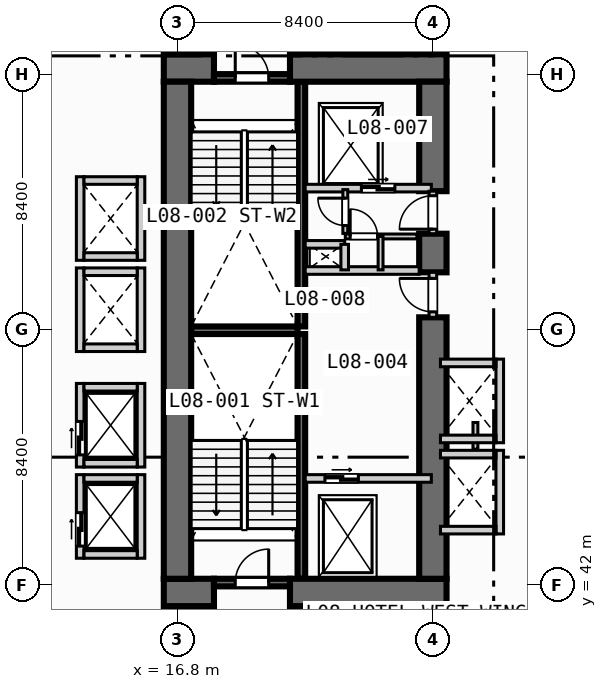
"""IFC4 building model, lengths in metres.
Left out: names, types, materials, properties, quantities, classifications, styles, units other than length and angle.
Written with IfcOpenShell. Run it as: python <this file> out.ifc"""

import sys

from ifc_helpers import new_model, si_unit, direction, frame, frame_2d, origin, place, context, subcontext, project, spatial, rectangle, extrude, element, fill, save


model = new_model("IFC4")
c1 = context("Model", 3, precision=1e-05, world=origin(), true_north=direction((0.0, 1.0)))
c2 = subcontext(c1, "Body", "Model", "MODEL_VIEW")
j1 = project(units=[si_unit("LENGTHUNIT", "METRE"), si_unit("PLANEANGLEUNIT", "RADIAN")], contexts=[c1])
p1 = place(None, origin())
s1 = spatial("IfcSite", under=j1, at=p1, CompositionType="ELEMENT")
p2 = place(p1, origin())
s2 = spatial("IfcBuilding", under=s1, at=p2, CompositionType="ELEMENT")
p3 = place(p2, frame((0.0, 0.0, 39.6)))
s3 = spatial("IfcBuildingStorey", under=s2, at=p3, CompositionType="ELEMENT", Elevation=39.6)
for number, where, z_axis, x_axis in (
    (1, (20.875, 42.2, 0.0), (0.0, 0.0, 1.0), (0.0, 1.0, 0.0)),
    (2, (20.875, 50.5, 0.0), (0.0, 0.0, 1.0), (0.0, 1.0, 0.0)),
):
    element("IfcWall", number, at=place(p3, frame(where, z_axis=z_axis, x_axis=x_axis)), inside=s3, PredefinedType="SOLIDWALL", context=c2, shape_type="SweptSolid", body=[
        extrude(rectangle(XDim=8.05, YDim=0.25, at=frame_2d((4.025, 0.0))), origin(), (0.0, 0.0, 1.0), 3.55),
    ])
p4 = place(p3, frame((17.25, 50.375, 0.0), z_axis=(0.0, 0.0, 1.0), x_axis=(1.0, 0.0, 0.0)))
e3 = element("IfcWall", 3, at=p4, inside=s3, PredefinedType="SOLIDWALL", context=c2, shape_type="SweptSolid", body=[
    extrude(rectangle(XDim=3.5, YDim=0.25, at=frame_2d((1.75, 0.0))), origin(), (0.0, 0.0, 1.0), 3.55),
])
p5 = place(p3, frame((16.35, 41.75, 0.0), z_axis=(0.0, 0.0, 1.0), x_axis=(1.0, 0.0, 0.0)))
e4 = element("IfcWall", 4, at=p5, inside=s3, PredefinedType="SHEAR", context=c2, shape_type="SweptSolid", body=[
    extrude(rectangle(XDim=1.65, YDim=0.9, at=frame_2d((0.825, 0.0))), origin(), (0.0, 0.0, 1.0), 3.55),
])
p6 = place(p3, frame((20.5, 41.75, 0.0), z_axis=(0.0, 0.0, 1.0), x_axis=(1.0, 0.0, 0.0)))
e5 = element("IfcWall", 5, at=p6, inside=s3, PredefinedType="SHEAR", context=c2, shape_type="SweptSolid", body=[
    extrude(rectangle(XDim=5.15, YDim=0.9, at=frame_2d((2.575, 0.0))), origin(), (0.0, 0.0, 1.0), 3.55),
])
p7 = place(p3, frame((16.35, 59.0, 0.0), z_axis=(0.0, 0.0, 1.0), x_axis=(1.0, 0.0, 0.0)))
e6 = element("IfcWall", 6, at=p7, inside=s3, PredefinedType="SHEAR", context=c2, shape_type="SweptSolid", body=[
    extrude(rectangle(XDim=1.65, YDim=0.9, at=frame_2d((0.825, 0.0))), origin(), (0.0, 0.0, 1.0), 3.55),
])
p8 = place(p3, frame((20.5, 59.0, 0.0), z_axis=(0.0, 0.0, 1.0), x_axis=(1.0, 0.0, 0.0)))
e7 = element("IfcWall", 7, at=p8, inside=s3, PredefinedType="SHEAR", context=c2, shape_type="SweptSolid", body=[
    extrude(rectangle(XDim=5.15, YDim=0.9, at=frame_2d((2.575, 0.0))), origin(), (0.0, 0.0, 1.0), 3.55),
])
p9 = place(p3, frame((16.8, 42.2, 0.0), z_axis=(0.0, 0.0, 1.0), x_axis=(0.0, 1.0, 0.0)))
e8 = element("IfcWall", 8, at=p9, inside=s3, PredefinedType="SHEAR", context=c2, shape_type="SweptSolid", body=[
    extrude(rectangle(XDim=16.35, YDim=0.9, at=frame_2d((8.175, 0.0))), origin(), (0.0, 0.0, 1.0), 3.55),
])
p10 = place(p3, frame((25.2, 42.2, 0.0), z_axis=(0.0, 0.0, 1.0), x_axis=(0.0, 1.0, 0.0)))
e9 = element("IfcWall", 9, at=p10, inside=s3, PredefinedType="SHEAR", context=c2, shape_type="SweptSolid", body=[
    extrude(rectangle(XDim=8.6, YDim=0.9, at=frame_2d((4.3, 0.0))), origin(), (0.0, 0.0, 1.0), 3.55),
])
p11 = place(p3, frame((25.2, 52.28, 0.0), z_axis=(0.0, 0.0, 1.0), x_axis=(0.0, 1.0, 0.0)))
e10 = element("IfcWall", 10, at=p11, inside=s3, PredefinedType="SHEAR", context=c2, shape_type="SweptSolid", body=[
    extrude(rectangle(XDim=1.27, YDim=0.9, at=frame_2d((0.635, 0.0))), origin(), (0.0, 0.0, 1.0), 3.55),
])
p12 = place(p3, frame((25.2, 54.95, 0.0), z_axis=(0.0, 0.0, 1.0), x_axis=(0.0, 1.0, 0.0)))
e11 = element("IfcWall", 11, at=p12, inside=s3, PredefinedType="SHEAR", context=c2, shape_type="SweptSolid", body=[
    extrude(rectangle(XDim=3.6, YDim=0.9, at=frame_2d((1.8, 0.0))), origin(), (0.0, 0.0, 1.0), 3.55),
])
p13 = place(p3, frame((18.0, 42.075, 0.0), z_axis=(0.0, 0.0, 1.0), x_axis=(1.0, 0.0, 0.0)))
e12 = element("IfcWall", 12, at=p13, inside=s3, PredefinedType="SOLIDWALL", context=c2, shape_type="SweptSolid", body=[
    extrude(rectangle(XDim=2.5, YDim=0.25, at=frame_2d((1.25, 0.0))), origin(), (0.0, 0.0, 1.0), 3.55),
])
p14 = place(p13, frame((0.7, 0.0, 0.0)))
e13 = element("IfcOpeningElement", 13, at=p14, cuts=e12, PredefinedType="OPENING", context=c2, shape_type="SweptSolid", body=[
    extrude(rectangle(XDim=1.1, YDim=2.15, at=frame_2d((0.55, 1.075))), frame((0.0, 0.135, 0.0), z_axis=(0.0, -1.0, 0.0), x_axis=(1.0, 0.0, 0.0)), (0.0, 0.0, 1.0), 0.27),
])
p15 = place(p3, frame((18.0, 58.675, 0.0), z_axis=(0.0, 0.0, 1.0), x_axis=(1.0, 0.0, 0.0)))
e14 = element("IfcWall", 14, at=p15, inside=s3, PredefinedType="SOLIDWALL", context=c2, shape_type="SweptSolid", body=[
    extrude(rectangle(XDim=2.5, YDim=0.25, at=frame_2d((1.25, 0.0))), origin(), (0.0, 0.0, 1.0), 3.55),
])
p16 = place(p15, frame((0.7, 0.0, 0.0)))
e15 = element("IfcOpeningElement", 15, at=p16, cuts=e14, PredefinedType="OPENING", context=c2, shape_type="SweptSolid", body=[
    extrude(rectangle(XDim=1.1, YDim=2.15, at=frame_2d((0.55, 1.075))), frame((0.0, 0.135, 0.0), z_axis=(0.0, -1.0, 0.0), x_axis=(1.0, 0.0, 0.0)), (0.0, 0.0, 1.0), 0.27),
])
p17 = place(p3, frame((21.0, 45.5, 0.0), z_axis=(0.0, 0.0, 1.0), x_axis=(1.0, 0.0, 0.0)))
e16 = element("IfcWall", 16, at=p17, inside=s3, PredefinedType="SOLIDWALL", context=c2, shape_type="SweptSolid", body=[
    extrude(rectangle(XDim=4.15, YDim=0.25, at=frame_2d((2.075, 0.0))), origin(), (0.0, 0.0, 1.0), 3.55),
])
p18 = place(p17, frame((0.65, 0.0, 0.0)))
e17 = element("IfcOpeningElement", 17, at=p18, cuts=e16, PredefinedType="OPENING", context=c2, shape_type="SweptSolid", body=[
    extrude(rectangle(XDim=1.1, YDim=2.15, at=frame_2d((0.55, 1.075))), frame((0.0, 0.135, 0.0), z_axis=(0.0, -1.0, 0.0), x_axis=(1.0, 0.0, 0.0)), (0.0, 0.0, 1.0), 0.27),
])
p19 = place(p3, frame((25.2, 50.8, 0.0), z_axis=(0.0, 0.0, 1.0), x_axis=(0.0, 1.0, 0.0)))
e18 = element("IfcWall", 18, at=p19, inside=s3, PredefinedType="SOLIDWALL", context=c2, shape_type="SweptSolid", body=[
    extrude(rectangle(XDim=1.48, YDim=0.25, at=frame_2d((0.74, 0.0))), origin(), (0.0, 0.0, 1.0), 3.55),
])
p20 = place(p19, frame((0.18, 0.0, 0.0)))
e19 = element("IfcOpeningElement", 19, at=p20, cuts=e18, PredefinedType="OPENING", context=c2, shape_type="SweptSolid", body=[
    extrude(rectangle(XDim=1.1, YDim=2.15, at=frame_2d((0.55, 1.075))), frame((0.0, 0.135, 0.0), z_axis=(0.0, -1.0, 0.0), x_axis=(1.0, 0.0, 0.0)), (0.0, 0.0, 1.0), 0.27),
])
p21 = place(p3, frame((21.0, 52.34, 0.0), z_axis=(0.0, 0.0, 1.0), x_axis=(1.0, 0.0, 0.0)))
e20 = element("IfcWall", 20, at=p21, inside=s3, PredefinedType="SOLIDWALL", context=c2, shape_type="SweptSolid", body=[
    extrude(rectangle(XDim=3.75, YDim=0.25, at=frame_2d((1.875, 0.0))), origin(), (0.0, 0.0, 1.0), 3.55),
])
p22 = place(p3, frame((21.0, 55.05, 0.0), z_axis=(0.0, 0.0, 1.0), x_axis=(1.0, 0.0, 0.0)))
e21 = element("IfcWall", 21, at=p22, inside=s3, PredefinedType="SOLIDWALL", context=c2, shape_type="SweptSolid", body=[
    extrude(rectangle(XDim=4.15, YDim=0.25, at=frame_2d((2.075, 0.0))), origin(), (0.0, 0.0, 1.0), 3.55),
])
p23 = place(p22, frame((1.85, 0.0, 0.0)))
e22 = element("IfcOpeningElement", 22, at=p23, cuts=e21, PredefinedType="OPENING", context=c2, shape_type="SweptSolid", body=[
    extrude(rectangle(XDim=1.1, YDim=2.15, at=frame_2d((0.55, 1.075))), frame((0.0, 0.135, 0.0), z_axis=(0.0, -1.0, 0.0), x_axis=(1.0, 0.0, 0.0)), (0.0, 0.0, 1.0), 0.27),
])
p24 = place(p3, frame((25.2, 53.55, 0.0), z_axis=(0.0, 0.0, 1.0), x_axis=(0.0, 1.0, 0.0)))
e23 = element("IfcWall", 23, at=p24, inside=s3, PredefinedType="SOLIDWALL", context=c2, shape_type="SweptSolid", body=[
    extrude(rectangle(XDim=1.4, YDim=0.25, at=frame_2d((0.7, 0.0))), origin(), (0.0, 0.0, 1.0), 3.55),
])
p25 = place(p24, frame((0.15, 0.0, 0.0)))
e24 = element("IfcOpeningElement", 24, at=p25, cuts=e23, PredefinedType="OPENING", context=c2, shape_type="SweptSolid", body=[
    extrude(rectangle(XDim=1.1, YDim=2.15, at=frame_2d((0.55, 1.075))), frame((0.0, 0.135, 0.0), z_axis=(0.0, -1.0, 0.0), x_axis=(1.0, 0.0, 0.0)), (0.0, 0.0, 1.0), 0.27),
])
p26 = place(p3, frame((21.0, 53.2, 0.0), z_axis=(0.0, 0.0, 1.0), x_axis=(1.0, 0.0, 0.0)))
e25 = element("IfcWall", 25, at=p26, inside=s3, PredefinedType="SOLIDWALL", context=c2, shape_type="SweptSolid", body=[
    extrude(rectangle(XDim=1.3, YDim=0.25, at=frame_2d((0.65, 0.0))), origin(), (0.0, 0.0, 1.0), 3.55),
])
p27 = place(p3, frame((22.3, 52.36, 0.0), z_axis=(0.0, 0.0, 1.0), x_axis=(0.0, 1.0, 0.0)))
e26 = element("IfcWall", 26, at=p27, inside=s3, PredefinedType="SOLIDWALL", context=c2, shape_type="SweptSolid", body=[
    extrude(rectangle(XDim=0.84, YDim=0.25, at=frame_2d((0.42, 0.0))), origin(), (0.0, 0.0, 1.0), 3.55),
])
p28 = place(p3, frame((22.32, 53.56, 0.0), z_axis=(0.0, 0.0, 1.0), x_axis=(0.0, 1.0, 0.0)))
e27 = element("IfcWall", 27, at=p28, inside=s3, PredefinedType="PARTITIONING", context=c2, shape_type="SweptSolid", body=[
    extrude(rectangle(XDim=1.44, YDim=0.16, at=frame_2d((0.72, 0.0))), origin(), (0.0, 0.0, 1.0), 3.55),
])
p29 = place(p28, frame((0.26, 0.0, 0.0)))
e28 = element("IfcOpeningElement", 28, at=p29, cuts=e27, PredefinedType="OPENING", context=c2, shape_type="SweptSolid", body=[
    extrude(rectangle(XDim=0.9, YDim=2.1, at=frame_2d((0.45, 1.05))), frame((0.0, 0.09, 0.0), z_axis=(0.0, -1.0, 0.0), x_axis=(1.0, 0.0, 0.0)), (0.0, 0.0, 1.0), 0.18),
])
p30 = place(p3, frame((22.32, 53.46, 0.0), z_axis=(0.0, 0.0, 1.0), x_axis=(1.0, 0.0, 0.0)))
e29 = element("IfcWall", 29, at=p30, inside=s3, PredefinedType="PARTITIONING", context=c2, shape_type="SweptSolid", body=[
    extrude(rectangle(XDim=2.36, YDim=0.16, at=frame_2d((1.18, 0.0))), origin(), (0.0, 0.0, 1.0), 3.55),
])
p31 = place(p30, frame((0.16, 0.0, 0.0)))
e30 = element("IfcOpeningElement", 30, at=p31, cuts=e29, PredefinedType="OPENING", context=c2, shape_type="SweptSolid", body=[
    extrude(rectangle(XDim=0.9, YDim=2.1, at=frame_2d((0.45, 1.05))), frame((0.0, 0.09, 0.0), z_axis=(0.0, -1.0, 0.0), x_axis=(1.0, 0.0, 0.0)), (0.0, 0.0, 1.0), 0.18),
])
p32 = place(p3, frame((23.48, 52.36, 0.0), z_axis=(0.0, 0.0, 1.0), x_axis=(0.0, 1.0, 0.0)))
e31 = element("IfcWall", 31, at=p32, inside=s3, PredefinedType="PARTITIONING", context=c2, shape_type="SweptSolid", body=[
    extrude(rectangle(XDim=1.1, YDim=0.16, at=frame_2d((0.55, 0.0))), origin(), (0.0, 0.0, 1.0), 3.55),
])
p33 = place(p3, frame((13.6, 42.875, 0.0), z_axis=(0.0, 0.0, 1.0), x_axis=(0.0, 1.0, 0.0)))
e32 = element("IfcWall", 32, at=p33, inside=s3, PredefinedType="SOLIDWALL", context=c2, shape_type="SweptSolid", body=[
    extrude(rectangle(XDim=2.75, YDim=0.25, at=frame_2d((1.375, 0.0))), origin(), (0.0, 0.0, 1.0), 3.55),
])
p34 = place(p33, frame((0.4, 0.0, 0.0)))
e33 = element("IfcOpeningElement", 33, at=p34, cuts=e32, PredefinedType="OPENING", context=c2, shape_type="SweptSolid", body=[
    extrude(rectangle(XDim=1.1, YDim=2.15, at=frame_2d((0.55, 1.075))), frame((0.0, 0.135, 0.0), z_axis=(0.0, -1.0, 0.0), x_axis=(1.0, 0.0, 0.0)), (0.0, 0.0, 1.0), 0.27),
])
p35 = place(p3, frame((15.6, 42.875, 0.0), z_axis=(0.0, 0.0, 1.0), x_axis=(0.0, 1.0, 0.0)))
e34 = element("IfcWall", 34, at=p35, inside=s3, PredefinedType="SOLIDWALL", context=c2, shape_type="SweptSolid", body=[
    extrude(rectangle(XDim=2.75, YDim=0.25, at=frame_2d((1.375, 0.0))), origin(), (0.0, 0.0, 1.0), 3.55),
])
for number, where, z_axis, x_axis in (
    (35, (13.725, 43.0, 0.0), (0.0, 0.0, 1.0), (1.0, 0.0, 0.0)),
    (36, (13.725, 45.5, 0.0), (0.0, 0.0, 1.0), (1.0, 0.0, 0.0)),
):
    element("IfcWall", number, at=place(p3, frame(where, z_axis=z_axis, x_axis=x_axis)), inside=s3, PredefinedType="SOLIDWALL", context=c2, shape_type="SweptSolid", body=[
        extrude(rectangle(XDim=1.75, YDim=0.25, at=frame_2d((0.875, 0.0))), origin(), (0.0, 0.0, 1.0), 3.55),
    ])
p36 = place(p3, frame((13.6, 45.875, 0.0), z_axis=(0.0, 0.0, 1.0), x_axis=(0.0, 1.0, 0.0)))
e37 = element("IfcWall", 37, at=p36, inside=s3, PredefinedType="SOLIDWALL", context=c2, shape_type="SweptSolid", body=[
    extrude(rectangle(XDim=2.75, YDim=0.25, at=frame_2d((1.375, 0.0))), origin(), (0.0, 0.0, 1.0), 3.55),
])
p37 = place(p36, frame((0.4, 0.0, 0.0)))
e38 = element("IfcOpeningElement", 38, at=p37, cuts=e37, PredefinedType="OPENING", context=c2, shape_type="SweptSolid", body=[
    extrude(rectangle(XDim=1.1, YDim=2.15, at=frame_2d((0.55, 1.075))), frame((0.0, 0.135, 0.0), z_axis=(0.0, -1.0, 0.0), x_axis=(1.0, 0.0, 0.0)), (0.0, 0.0, 1.0), 0.27),
])
p38 = place(p3, frame((15.6, 45.875, 0.0), z_axis=(0.0, 0.0, 1.0), x_axis=(0.0, 1.0, 0.0)))
e39 = element("IfcWall", 39, at=p38, inside=s3, PredefinedType="SOLIDWALL", context=c2, shape_type="SweptSolid", body=[
    extrude(rectangle(XDim=2.75, YDim=0.25, at=frame_2d((1.375, 0.0))), origin(), (0.0, 0.0, 1.0), 3.55),
])
for number, where, z_axis, x_axis in (
    (40, (13.725, 46.0, 0.0), (0.0, 0.0, 1.0), (1.0, 0.0, 0.0)),
    (41, (13.725, 48.5, 0.0), (0.0, 0.0, 1.0), (1.0, 0.0, 0.0)),
):
    element("IfcWall", number, at=place(p3, frame(where, z_axis=z_axis, x_axis=x_axis)), inside=s3, PredefinedType="SOLIDWALL", context=c2, shape_type="SweptSolid", body=[
        extrude(rectangle(XDim=1.75, YDim=0.25, at=frame_2d((0.875, 0.0))), origin(), (0.0, 0.0, 1.0), 3.55),
    ])
for number, where, z_axis, x_axis in (
    (42, (13.6, 49.675, 0.0), (0.0, 0.0, 1.0), (0.0, 1.0, 0.0)),
    (43, (15.6, 49.675, 0.0), (0.0, 0.0, 1.0), (0.0, 1.0, 0.0)),
):
    element("IfcWall", number, at=place(p3, frame(where, z_axis=z_axis, x_axis=x_axis)), inside=s3, PredefinedType="SOLIDWALL", context=c2, shape_type="SweptSolid", body=[
        extrude(rectangle(XDim=2.75, YDim=0.25, at=frame_2d((1.375, 0.0))), origin(), (0.0, 0.0, 1.0), 3.55),
    ])
for number, where, z_axis, x_axis in (
    (44, (13.725, 49.8, 0.0), (0.0, 0.0, 1.0), (1.0, 0.0, 0.0)),
    (45, (13.725, 52.3, 0.0), (0.0, 0.0, 1.0), (1.0, 0.0, 0.0)),
):
    element("IfcWall", number, at=place(p3, frame(where, z_axis=z_axis, x_axis=x_axis)), inside=s3, PredefinedType="SOLIDWALL", context=c2, shape_type="SweptSolid", body=[
        extrude(rectangle(XDim=1.75, YDim=0.25, at=frame_2d((0.875, 0.0))), origin(), (0.0, 0.0, 1.0), 3.55),
    ])
for number, where, z_axis, x_axis in (
    (46, (13.6, 52.675, 0.0), (0.0, 0.0, 1.0), (0.0, 1.0, 0.0)),
    (47, (15.6, 52.675, 0.0), (0.0, 0.0, 1.0), (0.0, 1.0, 0.0)),
):
    element("IfcWall", number, at=place(p3, frame(where, z_axis=z_axis, x_axis=x_axis)), inside=s3, PredefinedType="SOLIDWALL", context=c2, shape_type="SweptSolid", body=[
        extrude(rectangle(XDim=2.75, YDim=0.25, at=frame_2d((1.375, 0.0))), origin(), (0.0, 0.0, 1.0), 3.55),
    ])
for number, where, z_axis, x_axis in (
    (48, (13.725, 52.8, 0.0), (0.0, 0.0, 1.0), (1.0, 0.0, 0.0)),
    (49, (13.725, 55.3, 0.0), (0.0, 0.0, 1.0), (1.0, 0.0, 0.0)),
):
    element("IfcWall", number, at=place(p3, frame(where, z_axis=z_axis, x_axis=x_axis)), inside=s3, PredefinedType="SOLIDWALL", context=c2, shape_type="SweptSolid", body=[
        extrude(rectangle(XDim=1.75, YDim=0.25, at=frame_2d((0.875, 0.0))), origin(), (0.0, 0.0, 1.0), 3.55),
    ])
p39 = place(p3, frame((27.4, 43.675, 0.0), z_axis=(0.0, 0.0, 1.0), x_axis=(0.0, 1.0, 0.0)))
e50 = element("IfcWall", 50, at=p39, inside=s3, PredefinedType="SOLIDWALL", context=c2, shape_type="SweptSolid", body=[
    extrude(rectangle(XDim=2.75, YDim=0.25, at=frame_2d((1.375, 0.0))), origin(), (0.0, 0.0, 1.0), 3.55),
])
for number, where, z_axis, x_axis in (
    (51, (25.45, 43.8, 0.0), (0.0, 0.0, 1.0), (1.0, 0.0, 0.0)),
    (52, (25.45, 46.3, 0.0), (0.0, 0.0, 1.0), (1.0, 0.0, 0.0)),
):
    element("IfcWall", number, at=place(p3, frame(where, z_axis=z_axis, x_axis=x_axis)), inside=s3, PredefinedType="SOLIDWALL", context=c2, shape_type="SweptSolid", body=[
        extrude(rectangle(XDim=1.825, YDim=0.25, at=frame_2d((0.913, 0.0))), origin(), (0.0, 0.0, 1.0), 3.55),
    ])
p40 = place(p3, frame((26.6, 46.46, 0.0), z_axis=(0.0, 0.0, 1.0), x_axis=(0.0, 1.0, 0.0)))
e53 = element("IfcWall", 53, at=p40, inside=s3, PredefinedType="PARTITIONING", context=c2, shape_type="SweptSolid", body=[
    extrude(rectangle(XDim=0.88, YDim=0.16, at=frame_2d((0.44, 0.0))), origin(), (0.0, 0.0, 1.0), 3.55),
])
p41 = place(p3, frame((27.4, 46.675, 0.0), z_axis=(0.0, 0.0, 1.0), x_axis=(0.0, 1.0, 0.0)))
e54 = element("IfcWall", 54, at=p41, inside=s3, PredefinedType="SOLIDWALL", context=c2, shape_type="SweptSolid", body=[
    extrude(rectangle(XDim=2.75, YDim=0.25, at=frame_2d((1.375, 0.0))), origin(), (0.0, 0.0, 1.0), 3.55),
])
for number, where, z_axis, x_axis in (
    (55, (25.45, 46.8, 0.0), (0.0, 0.0, 1.0), (1.0, 0.0, 0.0)),
    (56, (25.45, 49.3, 0.0), (0.0, 0.0, 1.0), (1.0, 0.0, 0.0)),
):
    element("IfcWall", number, at=place(p3, frame(where, z_axis=z_axis, x_axis=x_axis)), inside=s3, PredefinedType="SOLIDWALL", context=c2, shape_type="SweptSolid", body=[
        extrude(rectangle(XDim=1.825, YDim=0.25, at=frame_2d((0.913, 0.0))), origin(), (0.0, 0.0, 1.0), 3.55),
    ])
p42 = place(p14, origin())
e57 = element("IfcDoor", 57, at=p42, inside=s3, OperationType="SINGLE_SWING_RIGHT", PredefinedType="DOOR", context=c2, shape_type="SweptSolid", body=[
    extrude(rectangle(XDim=1.1, YDim=2.15, at=frame_2d((0.55, 1.075))), frame((0.0, 0.025, 0.0), z_axis=(0.0, -1.0, 0.0), x_axis=(1.0, 0.0, 0.0)), (0.0, 0.0, 1.0), 0.05),
])
fill(e13, e57)
p43 = place(p16, origin())
e58 = element("IfcDoor", 58, at=p43, inside=s3, OperationType="SINGLE_SWING_LEFT", PredefinedType="DOOR", context=c2, shape_type="SweptSolid", body=[
    extrude(rectangle(XDim=1.1, YDim=2.15, at=frame_2d((0.55, 1.075))), frame((0.0, 0.025, 0.0), z_axis=(0.0, -1.0, 0.0), x_axis=(1.0, 0.0, 0.0)), (0.0, 0.0, 1.0), 0.05),
])
fill(e15, e58)
p44 = place(p18, origin())
e59 = element("IfcDoor", 59, at=p44, inside=s3, OperationType="SLIDING_TO_LEFT", PredefinedType="DOOR", context=c2, shape_type="SweptSolid", body=[
    extrude(rectangle(XDim=1.1, YDim=2.15, at=frame_2d((0.55, 1.075))), frame((0.0, 0.025, 0.0), z_axis=(0.0, -1.0, 0.0), x_axis=(1.0, 0.0, 0.0)), (0.0, 0.0, 1.0), 0.05),
])
fill(e17, e59)
p45 = place(p20, origin())
e60 = element("IfcDoor", 60, at=p45, inside=s3, OperationType="SINGLE_SWING_RIGHT", PredefinedType="DOOR", context=c2, shape_type="SweptSolid", body=[
    extrude(rectangle(XDim=1.1, YDim=2.15, at=frame_2d((0.55, 1.075))), frame((0.0, 0.025, 0.0), z_axis=(0.0, -1.0, 0.0), x_axis=(1.0, 0.0, 0.0)), (0.0, 0.0, 1.0), 0.05),
])
fill(e19, e60)
p46 = place(p23, origin())
e61 = element("IfcDoor", 61, at=p46, inside=s3, OperationType="SLIDING_TO_LEFT", PredefinedType="DOOR", context=c2, shape_type="SweptSolid", body=[
    extrude(rectangle(XDim=1.1, YDim=2.15, at=frame_2d((0.55, 1.075))), frame((0.0, 0.025, 0.0), z_axis=(0.0, -1.0, 0.0), x_axis=(1.0, 0.0, 0.0)), (0.0, 0.0, 1.0), 0.05),
])
fill(e22, e61)
p47 = place(p25, origin())
e62 = element("IfcDoor", 62, at=p47, inside=s3, OperationType="SINGLE_SWING_LEFT", PredefinedType="DOOR", context=c2, shape_type="SweptSolid", body=[
    extrude(rectangle(XDim=1.1, YDim=2.15, at=frame_2d((0.55, 1.075))), frame((0.0, 0.025, 0.0), z_axis=(0.0, -1.0, 0.0), x_axis=(1.0, 0.0, 0.0)), (0.0, 0.0, 1.0), 0.05),
])
fill(e24, e62)
p48 = place(p29, origin())
e63 = element("IfcDoor", 63, at=p48, inside=s3, OperationType="SINGLE_SWING_RIGHT", PredefinedType="DOOR", context=c2, shape_type="SweptSolid", body=[
    extrude(rectangle(XDim=0.9, YDim=2.1, at=frame_2d((0.45, 1.05))), frame((0.0, 0.025, 0.0), z_axis=(0.0, -1.0, 0.0), x_axis=(1.0, 0.0, 0.0)), (0.0, 0.0, 1.0), 0.05),
])
fill(e28, e63)
p49 = place(p31, origin())
e64 = element("IfcDoor", 64, at=p49, inside=s3, OperationType="SINGLE_SWING_LEFT", PredefinedType="DOOR", context=c2, shape_type="SweptSolid", body=[
    extrude(rectangle(XDim=0.9, YDim=2.1, at=frame_2d((0.45, 1.05))), frame((0.0, 0.025, 0.0), z_axis=(0.0, -1.0, 0.0), x_axis=(1.0, 0.0, 0.0)), (0.0, 0.0, 1.0), 0.05),
])
fill(e30, e64)
p50 = place(p34, origin())
e65 = element("IfcDoor", 65, at=p50, inside=s3, OperationType="SLIDING_TO_LEFT", PredefinedType="DOOR", context=c2, shape_type="SweptSolid", body=[
    extrude(rectangle(XDim=1.1, YDim=2.15, at=frame_2d((0.55, 1.075))), frame((0.0, 0.025, 0.0), z_axis=(0.0, -1.0, 0.0), x_axis=(1.0, 0.0, 0.0)), (0.0, 0.0, 1.0), 0.05),
])
fill(e33, e65)
p51 = place(p37, origin())
e66 = element("IfcDoor", 66, at=p51, inside=s3, OperationType="SLIDING_TO_LEFT", PredefinedType="DOOR", context=c2, shape_type="SweptSolid", body=[
    extrude(rectangle(XDim=1.1, YDim=2.15, at=frame_2d((0.55, 1.075))), frame((0.0, 0.025, 0.0), z_axis=(0.0, -1.0, 0.0), x_axis=(1.0, 0.0, 0.0)), (0.0, 0.0, 1.0), 0.05),
])
fill(e38, e66)
save(model, sys.argv[1])
